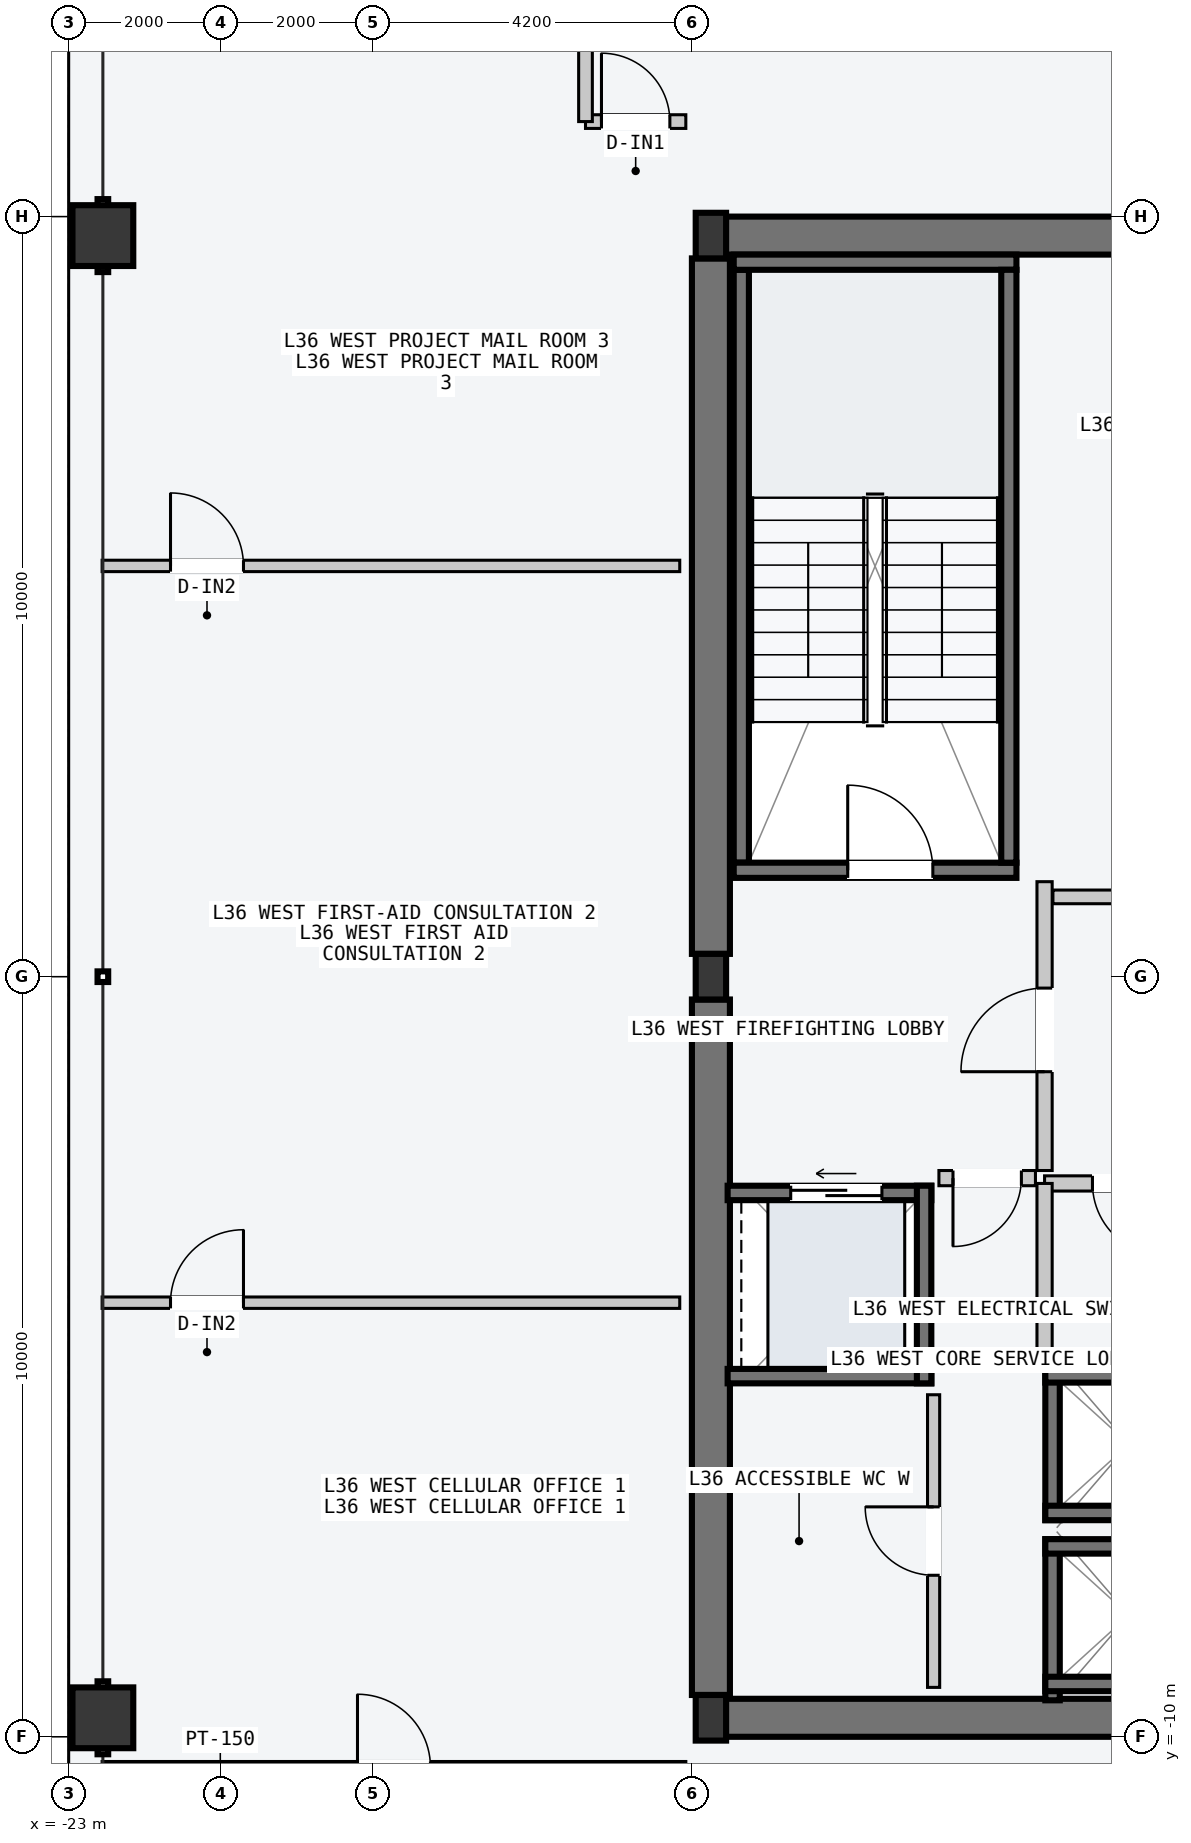
"""IFC4 building model, lengths in metres.
Left out: names, types, materials, properties, quantities, classifications, styles, units other than length and angle.
Written with IfcOpenShell. Run it as: python <this file> out.ifc"""

import sys

from ifc_helpers import new_model, si_unit, direction, frame, frame_2d, origin, origin_2d, place, context, subcontext, project, spatial, rectangle, hollow_rectangle, i_section, extrude, element, fill, save


model = new_model("IFC4")
c1 = context("Model", 3, precision=1e-05, world=origin(), true_north=direction((0.0, 1.0)))
c2 = subcontext(c1, "Body", "Model", "MODEL_VIEW")
j1 = project(units=[si_unit("LENGTHUNIT", "METRE"), si_unit("PLANEANGLEUNIT", "RADIAN")], contexts=[c1])
p1 = place(None, origin())
s1 = spatial("IfcSite", under=j1, at=p1, CompositionType="ELEMENT")
p2 = place(p1, origin())
s2 = spatial("IfcBuilding", under=s1, at=p2, CompositionType="ELEMENT")
p3 = place(p2, frame((0.0, 0.0, 138.6)))
s3 = spatial("IfcBuildingStorey", under=s2, at=p3, CompositionType="ELEMENT", Elevation=138.6)
for number, where, z_axis, x_axis in (
    (1, (-14.53, -9.75, -0.2), (0.0, 0.0, 1.0), (1.0, 0.0, 0.0)),
    (2, (-14.53, 9.75, -0.2), (0.0, 0.0, 1.0), (1.0, 0.0, 0.0)),
):
    element("IfcWall", number, at=place(p3, frame(where, z_axis=z_axis, x_axis=x_axis)), inside=s3, PredefinedType="SHEAR", context=c2, shape_type="SweptSolid", body=[
        extrude(rectangle(XDim=6.46, YDim=0.5, at=frame_2d((3.23, 0.0))), origin(), (0.0, 0.0, 1.0), 3.6),
    ])
for number, where, z_axis, x_axis in (
    (3, (-14.55, -9.45, -0.2), (0.0, 0.0, 1.0), (0.0, 1.0, 0.0)),
    (4, (-14.55, 0.3, -0.2), (0.0, 0.0, 1.0), (0.0, 1.0, 0.0)),
):
    element("IfcWall", number, at=place(p3, frame(where, z_axis=z_axis, x_axis=x_axis)), inside=s3, PredefinedType="SHEAR", context=c2, shape_type="SweptSolid", body=[
        extrude(rectangle(XDim=9.15, YDim=0.5, at=frame_2d((4.575, 0.0))), origin(), (0.0, 0.0, 1.0), 3.6),
    ])
p4 = place(p3, frame((-14.15, 1.5, -0.2), z_axis=(0.0, 0.0, 1.0), x_axis=(0.0, 1.0, 0.0)))
e5 = element("IfcWall", 5, at=p4, inside=s3, PredefinedType="SOLIDWALL", context=c2, shape_type="SweptSolid", body=[
    extrude(rectangle(XDim=7.8, YDim=0.2, at=frame_2d((3.9, 0.0))), origin(), (0.0, 0.0, 1.0), 3.6),
])
p5 = place(p3, frame((-14.25, 1.4, -0.2), z_axis=(0.0, 0.0, 1.0), x_axis=(1.0, 0.0, 0.0)))
e6 = element("IfcWall", 6, at=p5, inside=s3, PredefinedType="SOLIDWALL", context=c2, shape_type="SweptSolid", body=[
    extrude(rectangle(XDim=3.72, YDim=0.2, at=frame_2d((1.86, 0.0))), origin(), (0.0, 0.0, 1.0), 3.6),
])
p6 = place(p5, frame((1.5, 0.0, 0.2)))
e7 = element("IfcOpeningElement", 7, at=p6, cuts=e6, PredefinedType="OPENING", context=c2, shape_type="SweptSolid", body=[
    extrude(rectangle(XDim=1.12, YDim=2.18, at=frame_2d((0.56, 1.09))), frame((0.0, 0.11, 0.0), z_axis=(0.0, -1.0, 0.0), x_axis=(1.0, 0.0, 0.0)), (0.0, 0.0, 1.0), 0.22),
])
p7 = place(p3, frame((-14.25, 9.4, -0.2), z_axis=(0.0, 0.0, 1.0), x_axis=(1.0, 0.0, 0.0)))
e8 = element("IfcWall", 8, at=p7, inside=s3, PredefinedType="SOLIDWALL", context=c2, shape_type="SweptSolid", body=[
    extrude(rectangle(XDim=3.72, YDim=0.2, at=frame_2d((1.86, 0.0))), origin(), (0.0, 0.0, 1.0), 3.6),
])
p8 = place(p3, frame((-10.63, 1.5, -0.2), z_axis=(0.0, 0.0, 1.0), x_axis=(0.0, 1.0, 0.0)))
e9 = element("IfcWall", 9, at=p8, inside=s3, PredefinedType="SOLIDWALL", context=c2, shape_type="SweptSolid", body=[
    extrude(rectangle(XDim=7.8, YDim=0.2, at=frame_2d((3.9, 0.0))), origin(), (0.0, 0.0, 1.0), 3.6),
])
for number, where, z_axis, x_axis in (
    (10, (-14.55, -9.75, 0.0), (0.0, 0.0, 1.0), (1.0, 0.0, 0.0)),
    (11, (-14.55, 0.0, 0.0), (0.0, 0.0, 1.0), (1.0, 0.0, 0.0)),
    (12, (-14.55, 9.75, 0.0), (0.0, 0.0, 1.0), (1.0, 0.0, 0.0)),
):
    element("IfcColumn", number, at=place(p3, frame(where, z_axis=z_axis, x_axis=x_axis)), inside=s3, PredefinedType="COLUMN", context=c2, shape_type="SweptSolid", body=[
        extrude(i_section(OverallWidth=0.4, OverallDepth=0.6, WebThickness=0.022, FlangeThickness=0.036, at=origin_2d()), origin(), (0.0, 0.0, 1.0), 3.6),
    ])
for number, where, z_axis, x_axis in (
    (13, (-22.55, -9.75, 0.0), (0.0, 0.0, 1.0), (0.0, 1.0, 0.0)),
    (14, (-22.55, 9.75, 0.0), (0.0, 0.0, 1.0), (0.0, 1.0, 0.0)),
):
    element("IfcColumn", number, at=place(p3, frame(where, z_axis=z_axis, x_axis=x_axis)), inside=s3, PredefinedType="COLUMN", context=c2, shape_type="SweptSolid", body=[
        extrude(hollow_rectangle(XDim=0.8, YDim=0.8, WallThickness=0.036, at=origin_2d()), origin(), (0.0, 0.0, 1.0), 3.6),
    ])
p9 = place(p3, frame((-10.055, -9.52, -0.2), z_axis=(0.0, 0.0, 1.0), x_axis=(0.0, 1.0, 0.0)))
e15 = element("IfcWall", 15, at=p9, inside=s3, PredefinedType="SOLIDWALL", context=c2, shape_type="SweptSolid", body=[
    extrude(rectangle(XDim=2.12, YDim=0.19, at=frame_2d((1.06, 0.0))), origin(), (0.0, 0.0, 1.0), 3.6),
])
for number, where, z_axis, x_axis in (
    (16, (-10.15, -7.495, -0.2), (0.0, 0.0, 1.0), (1.0, 0.0, 0.0)),
    (17, (-10.15, -9.305, -0.2), (0.0, 0.0, 1.0), (1.0, 0.0, 0.0)),
):
    element("IfcWall", number, at=place(p3, frame(where, z_axis=z_axis, x_axis=x_axis)), inside=s3, PredefinedType="SOLIDWALL", context=c2, shape_type="SweptSolid", body=[
        extrude(rectangle(XDim=2.2, YDim=0.19, at=frame_2d((1.1, 0.0))), origin(), (0.0, 0.0, 1.0), 3.6),
    ])
p10 = place(p3, frame((-10.055, -7.15, -0.2), z_axis=(0.0, 0.0, 1.0), x_axis=(0.0, 1.0, 0.0)))
e18 = element("IfcWall", 18, at=p10, inside=s3, PredefinedType="SOLIDWALL", context=c2, shape_type="SweptSolid", body=[
    extrude(rectangle(XDim=2.0, YDim=0.19, at=frame_2d((1.0, 0.0))), origin(), (0.0, 0.0, 1.0), 3.6),
])
for number, where, z_axis, x_axis in (
    (19, (-10.15, -5.245, -0.2), (0.0, 0.0, 1.0), (1.0, 0.0, 0.0)),
    (20, (-10.15, -7.055, -0.2), (0.0, 0.0, 1.0), (1.0, 0.0, 0.0)),
):
    element("IfcWall", number, at=place(p3, frame(where, z_axis=z_axis, x_axis=x_axis)), inside=s3, PredefinedType="SOLIDWALL", context=c2, shape_type="SweptSolid", body=[
        extrude(rectangle(XDim=2.2, YDim=0.19, at=frame_2d((1.1, 0.0))), origin(), (0.0, 0.0, 1.0), 3.6),
    ])
p11 = place(p3, frame((-14.33, -2.845, -0.2), z_axis=(0.0, 0.0, 1.0), x_axis=(1.0, 0.0, 0.0)))
e21 = element("IfcWall", 21, at=p11, inside=s3, PredefinedType="SOLIDWALL", context=c2, shape_type="SweptSolid", body=[
    extrude(rectangle(XDim=2.68, YDim=0.19, at=frame_2d((1.34, 0.0))), origin(), (0.0, 0.0, 1.0), 3.6),
])
p12 = place(p11, frame((0.83, 0.0, 0.2)))
e22 = element("IfcOpeningElement", 22, at=p12, cuts=e21, PredefinedType="OPENING", context=c2, shape_type="SweptSolid", body=[
    extrude(rectangle(XDim=1.2, YDim=2.2, at=frame_2d((0.6, 1.1))), frame((0.0, 0.105, 0.0), z_axis=(0.0, -1.0, 0.0), x_axis=(1.0, 0.0, 0.0)), (0.0, 0.0, 1.0), 0.21),
])
p13 = place(p3, frame((-14.33, -5.255, -0.2), z_axis=(0.0, 0.0, 1.0), x_axis=(1.0, 0.0, 0.0)))
e23 = element("IfcWall", 23, at=p13, inside=s3, PredefinedType="SOLIDWALL", context=c2, shape_type="SweptSolid", body=[
    extrude(rectangle(XDim=2.68, YDim=0.19, at=frame_2d((1.34, 0.0))), origin(), (0.0, 0.0, 1.0), 3.6),
])
p14 = place(p3, frame((-11.745, -5.35, -0.2), z_axis=(0.0, 0.0, 1.0), x_axis=(0.0, 1.0, 0.0)))
e24 = element("IfcWall", 24, at=p14, inside=s3, PredefinedType="SOLIDWALL", context=c2, shape_type="SweptSolid", body=[
    extrude(rectangle(XDim=2.6, YDim=0.19, at=frame_2d((1.3, 0.0))), origin(), (0.0, 0.0, 1.0), 3.6),
])
p15 = place(p3, frame((-10.16, -2.55, 0.0), z_axis=(0.0, 0.0, 1.0), x_axis=(0.0, 1.0, 0.0)))
e25 = element("IfcWall", 25, at=p15, inside=s3, PredefinedType="PARTITIONING", context=c2, shape_type="SweptSolid", body=[
    extrude(rectangle(XDim=3.8, YDim=0.2, at=frame_2d((1.9, 0.0))), origin(), (0.0, 0.0, 1.0), 3.4),
])
p16 = place(p15, frame((1.3, 0.0, 0.0)))
e26 = element("IfcOpeningElement", 26, at=p16, cuts=e25, PredefinedType="OPENING", context=c2, shape_type="SweptSolid", body=[
    extrude(rectangle(XDim=1.1, YDim=2.15, at=frame_2d((0.55, 1.075))), frame((0.0, 0.11, 0.0), z_axis=(0.0, -1.0, 0.0), x_axis=(1.0, 0.0, 0.0)), (0.0, 0.0, 1.0), 0.22),
])
p17 = place(p3, frame((-10.28, -2.65, 0.0), z_axis=(0.0, 0.0, 1.0), x_axis=(-1.0, 0.0, 0.0)))
e27 = element("IfcWall", 27, at=p17, inside=s3, PredefinedType="PARTITIONING", context=c2, shape_type="SweptSolid", body=[
    extrude(rectangle(XDim=1.27, YDim=0.2, at=frame_2d((0.635, 0.0))), origin(), (0.0, 0.0, 1.0), 3.4),
])
p18 = place(p17, frame((0.185, 0.0, 0.0)))
e28 = element("IfcOpeningElement", 28, at=p18, cuts=e27, PredefinedType="OPENING", context=c2, shape_type="SweptSolid", body=[
    extrude(rectangle(XDim=0.9, YDim=2.15, at=frame_2d((0.45, 1.075))), frame((0.0, 0.11, 0.0), z_axis=(0.0, -1.0, 0.0), x_axis=(1.0, 0.0, 0.0)), (0.0, 0.0, 1.0), 0.22),
])
p19 = place(p3, frame((-7.96, -2.72, 0.0), z_axis=(0.0, 0.0, 1.0), x_axis=(-1.0, 0.0, 0.0)))
e29 = element("IfcWall", 29, at=p19, inside=s3, PredefinedType="PARTITIONING", context=c2, shape_type="SweptSolid", body=[
    extrude(rectangle(XDim=2.2, YDim=0.2, at=frame_2d((1.1, 0.0))), origin(), (0.0, 0.0, 1.0), 3.4),
])
p20 = place(p19, frame((0.62, 0.0, 0.0)))
e30 = element("IfcOpeningElement", 30, at=p20, cuts=e29, PredefinedType="OPENING", context=c2, shape_type="SweptSolid", body=[
    extrude(rectangle(XDim=0.95, YDim=2.1, at=frame_2d((0.475, 1.05))), frame((0.0, 0.11, 0.0), z_axis=(0.0, -1.0, 0.0), x_axis=(1.0, 0.0, 0.0)), (0.0, 0.0, 1.0), 0.22),
])
p21 = place(p3, frame((-10.16, -5.16, 0.0), z_axis=(0.0, 0.0, 1.0), x_axis=(0.0, 1.0, 0.0)))
e31 = element("IfcWall", 31, at=p21, inside=s3, PredefinedType="PARTITIONING", context=c2, shape_type="SweptSolid", body=[
    extrude(rectangle(XDim=2.44, YDim=0.2, at=frame_2d((1.22, 0.0))), origin(), (0.0, 0.0, 1.0), 3.4),
])
p22 = place(p3, frame((-11.62, -9.35, 0.0), z_axis=(0.0, 0.0, 1.0), x_axis=(0.0, 1.0, 0.0)))
e32 = element("IfcWall", 32, at=p22, inside=s3, PredefinedType="PARTITIONING", context=c2, shape_type="SweptSolid", body=[
    extrude(rectangle(XDim=3.85, YDim=0.16, at=frame_2d((1.925, 0.0))), origin(), (0.0, 0.0, 1.0), 3.4),
])
p23 = place(p22, frame((1.475, 0.0, 0.0)))
e33 = element("IfcOpeningElement", 33, at=p23, cuts=e32, PredefinedType="OPENING", context=c2, shape_type="SweptSolid", body=[
    extrude(rectangle(XDim=0.9, YDim=2.15, at=frame_2d((0.45, 1.075))), frame((0.0, 0.09, 0.0), z_axis=(0.0, -1.0, 0.0), x_axis=(1.0, 0.0, 0.0)), (0.0, 0.0, 1.0), 0.18),
])
p24 = place(p3, frame((-10.05, 1.05, 0.0), z_axis=(0.0, 0.0, 1.0), x_axis=(1.0, 0.0, 0.0)))
e34 = element("IfcWall", 34, at=p24, inside=s3, PredefinedType="PARTITIONING", context=c2, shape_type="SweptSolid", body=[
    extrude(rectangle(XDim=6.21, YDim=0.18, at=frame_2d((3.105, 0.0))), origin(), (0.0, 0.0, 1.0), 3.4),
])
p25 = place(p3, frame((-22.56, -10.4, 0.0), z_axis=(0.0, 0.0, 1.0), x_axis=(1.0, 0.0, 0.0)))
e35 = element("IfcWall", 35, at=p25, inside=s3, PredefinedType="PARTITIONING", context=c2, shape_type="SweptSolid", body=[
    extrude(rectangle(XDim=7.68, YDim=0.15, at=frame_2d((3.84, 0.0))), origin(), (0.0, 0.0, 1.0), 3.4),
])
p26 = place(p25, frame((3.36, 0.0, 0.0)))
e36 = element("IfcOpeningElement", 36, at=p26, cuts=e35, PredefinedType="OPENING", context=c2, shape_type="SweptSolid", body=[
    extrude(rectangle(XDim=0.96, YDim=2.18, at=frame_2d((0.48, 1.09))), frame((0.0, 0.085, 0.0), z_axis=(0.0, -1.0, 0.0), x_axis=(1.0, 0.0, 0.0)), (0.0, 0.0, 1.0), 0.17),
])
p27 = place(p3, frame((-16.2, 11.25, 0.0), z_axis=(0.0, 0.0, 1.0), x_axis=(1.0, 0.0, 0.0)))
e37 = element("IfcWall", 37, at=p27, inside=s3, PredefinedType="PARTITIONING", context=c2, shape_type="SweptSolid", body=[
    extrude(rectangle(XDim=1.32, YDim=0.18, at=frame_2d((0.66, 0.0))), origin(), (0.0, 0.0, 1.0), 3.4),
])
p28 = place(p27, frame((0.21, 0.0, 0.0)))
e38 = element("IfcOpeningElement", 38, at=p28, cuts=e37, PredefinedType="OPENING", context=c2, shape_type="SweptSolid", body=[
    extrude(rectangle(XDim=0.9, YDim=2.15, at=frame_2d((0.45, 1.075))), frame((0.0, 0.1, 0.0), z_axis=(0.0, -1.0, 0.0), x_axis=(1.0, 0.0, 0.0)), (0.0, 0.0, 1.0), 0.2),
])
p29 = place(p3, frame((-16.2, 11.25, 0.0), z_axis=(0.0, 0.0, 1.0), x_axis=(0.0, 1.0, 0.0)))
e39 = element("IfcWall", 39, at=p29, inside=s3, PredefinedType="PARTITIONING", context=c2, shape_type="SweptSolid", body=[
    extrude(rectangle(XDim=1.95, YDim=0.18, at=frame_2d((0.975, 0.0))), origin(), (0.0, 0.0, 1.0), 3.4),
])
p30 = place(p3, frame((-22.56, -4.289, 0.0), z_axis=(0.0, 0.0, 1.0), x_axis=(1.0, 0.0, 0.0)))
e40 = element("IfcWall", 40, at=p30, inside=s3, PredefinedType="PARTITIONING", context=c2, shape_type="SweptSolid", body=[
    extrude(rectangle(XDim=7.6, YDim=0.15, at=frame_2d((3.8, 0.0))), origin(), (0.0, 0.0, 1.0), 3.4),
])
p31 = place(p30, frame((0.9, 0.0, 0.0)))
e41 = element("IfcOpeningElement", 41, at=p31, cuts=e40, PredefinedType="OPENING", context=c2, shape_type="SweptSolid", body=[
    extrude(rectangle(XDim=0.96, YDim=2.18, at=frame_2d((0.48, 1.09))), frame((0.0, 0.085, 0.0), z_axis=(0.0, -1.0, 0.0), x_axis=(1.0, 0.0, 0.0)), (0.0, 0.0, 1.0), 0.17),
])
p32 = place(p3, frame((-22.56, 5.404, 0.0), z_axis=(0.0, 0.0, 1.0), x_axis=(1.0, 0.0, 0.0)))
e42 = element("IfcWall", 42, at=p32, inside=s3, PredefinedType="PARTITIONING", context=c2, shape_type="SweptSolid", body=[
    extrude(rectangle(XDim=7.6, YDim=0.15, at=frame_2d((3.8, 0.0))), origin(), (0.0, 0.0, 1.0), 3.4),
])
p33 = place(p32, frame((0.9, 0.0, 0.0)))
e43 = element("IfcOpeningElement", 43, at=p33, cuts=e42, PredefinedType="OPENING", context=c2, shape_type="SweptSolid", body=[
    extrude(rectangle(XDim=0.96, YDim=2.18, at=frame_2d((0.48, 1.09))), frame((0.0, 0.085, 0.0), z_axis=(0.0, -1.0, 0.0), x_axis=(1.0, 0.0, 0.0)), (0.0, 0.0, 1.0), 0.17),
])
p34 = place(p6, origin())
e44 = element("IfcDoor", 44, at=p34, inside=s3, OperationType="SINGLE_SWING_LEFT", PredefinedType="DOOR", context=c2, shape_type="SweptSolid", body=[
    extrude(rectangle(XDim=1.12, YDim=2.18, at=frame_2d((0.56, 1.09))), frame((0.0, 0.025, 0.0), z_axis=(0.0, -1.0, 0.0), x_axis=(1.0, 0.0, 0.0)), (0.0, 0.0, 1.0), 0.05),
])
fill(e7, e44)
p35 = place(p12, origin())
e45 = element("IfcDoor", 45, at=p35, inside=s3, OperationType="SLIDING_TO_LEFT", PredefinedType="DOOR", context=c2, shape_type="SweptSolid", body=[
    extrude(rectangle(XDim=1.2, YDim=2.2, at=frame_2d((0.6, 1.1))), frame((0.0, 0.025, 0.0), z_axis=(0.0, -1.0, 0.0), x_axis=(1.0, 0.0, 0.0)), (0.0, 0.0, 1.0), 0.05),
])
fill(e22, e45)
p36 = place(p16, origin())
e46 = element("IfcDoor", 46, at=p36, inside=s3, OperationType="SINGLE_SWING_LEFT", PredefinedType="DOOR", context=c2, shape_type="SweptSolid", body=[
    extrude(rectangle(XDim=1.1, YDim=2.15, at=frame_2d((0.55, 1.075))), frame((0.0, 0.025, 0.0), z_axis=(0.0, -1.0, 0.0), x_axis=(1.0, 0.0, 0.0)), (0.0, 0.0, 1.0), 0.05),
])
fill(e26, e46)
p37 = place(p18, origin())
e47 = element("IfcDoor", 47, at=p37, inside=s3, OperationType="SINGLE_SWING_RIGHT", PredefinedType="DOOR", context=c2, shape_type="SweptSolid", body=[
    extrude(rectangle(XDim=0.9, YDim=2.15, at=frame_2d((0.45, 1.075))), frame((0.0, 0.025, 0.0), z_axis=(0.0, -1.0, 0.0), x_axis=(1.0, 0.0, 0.0)), (0.0, 0.0, 1.0), 0.05),
])
fill(e28, e47)
p38 = place(p20, origin())
e48 = element("IfcDoor", 48, at=p38, inside=s3, OperationType="SINGLE_SWING_LEFT", PredefinedType="DOOR", context=c2, shape_type="SweptSolid", body=[
    extrude(rectangle(XDim=0.95, YDim=2.1, at=frame_2d((0.475, 1.05))), frame((0.0, 0.025, 0.0), z_axis=(0.0, -1.0, 0.0), x_axis=(1.0, 0.0, 0.0)), (0.0, 0.0, 1.0), 0.05),
])
fill(e30, e48)
p39 = place(p23, origin())
e49 = element("IfcDoor", 49, at=p39, inside=s3, OperationType="SINGLE_SWING_RIGHT", PredefinedType="DOOR", context=c2, shape_type="SweptSolid", body=[
    extrude(rectangle(XDim=0.9, YDim=2.15, at=frame_2d((0.45, 1.075))), frame((0.0, 0.025, 0.0), z_axis=(0.0, -1.0, 0.0), x_axis=(1.0, 0.0, 0.0)), (0.0, 0.0, 1.0), 0.05),
])
fill(e33, e49)
p40 = place(p28, origin())
e50 = element("IfcDoor", 50, at=p40, inside=s3, OperationType="SINGLE_SWING_LEFT", PredefinedType="DOOR", context=c2, shape_type="SweptSolid", body=[
    extrude(rectangle(XDim=0.9, YDim=2.15, at=frame_2d((0.45, 1.075))), frame((0.0, 0.025, 0.0), z_axis=(0.0, -1.0, 0.0), x_axis=(1.0, 0.0, 0.0)), (0.0, 0.0, 1.0), 0.05),
])
fill(e38, e50)
p41 = place(p31, origin())
e51 = element("IfcDoor", 51, at=p41, inside=s3, OperationType="SINGLE_SWING_RIGHT", PredefinedType="DOOR", context=c2, shape_type="SweptSolid", body=[
    extrude(rectangle(XDim=0.96, YDim=2.18, at=frame_2d((0.48, 1.09))), frame((0.0, 0.025, 0.0), z_axis=(0.0, -1.0, 0.0), x_axis=(1.0, 0.0, 0.0)), (0.0, 0.0, 1.0), 0.05),
])
fill(e41, e51)
p42 = place(p33, origin())
e52 = element("IfcDoor", 52, at=p42, inside=s3, OperationType="SINGLE_SWING_LEFT", PredefinedType="DOOR", context=c2, shape_type="SweptSolid", body=[
    extrude(rectangle(XDim=0.96, YDim=2.18, at=frame_2d((0.48, 1.09))), frame((0.0, 0.025, 0.0), z_axis=(0.0, -1.0, 0.0), x_axis=(1.0, 0.0, 0.0)), (0.0, 0.0, 1.0), 0.05),
])
fill(e43, e52)
save(model, sys.argv[1])
